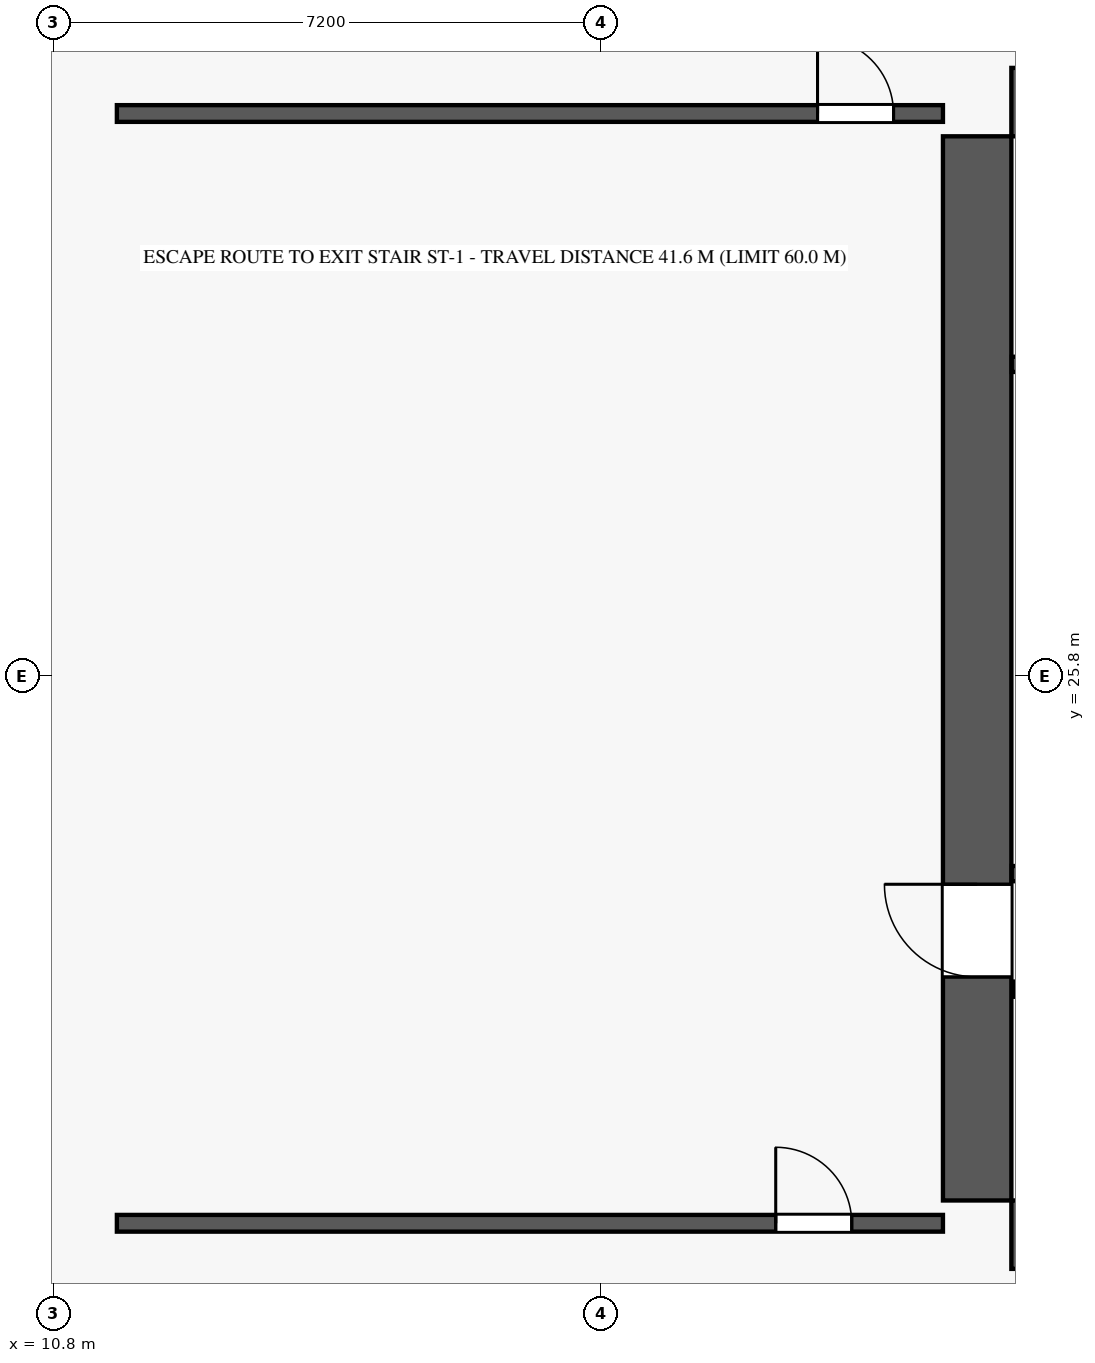
"""IFC4 building model, lengths in metres.
Left out: names, types, materials, properties, quantities, classifications, styles, units other than length and angle.
Written with IfcOpenShell. Run it as: python <this file> out.ifc"""

import sys

from ifc_helpers import new_model, si_unit, direction, frame, frame_2d, origin, origin_2d, place, context, subcontext, project, spatial, rectangle, extrude, element, fill, save


model = new_model("IFC4")
c1 = context("Model", 3, precision=1e-05, world=origin(), true_north=direction((0.0, 1.0)))
c2 = subcontext(c1, "Body", "Model", "MODEL_VIEW")
j1 = project(units=[si_unit("LENGTHUNIT", "METRE"), si_unit("PLANEANGLEUNIT", "RADIAN")], contexts=[c1])
p1 = place(None, origin())
s1 = spatial("IfcSite", under=j1, at=p1, CompositionType="ELEMENT")
p2 = place(p1, origin())
s2 = spatial("IfcBuilding", under=s1, at=p2, CompositionType="ELEMENT")
p3 = place(p2, frame((0.0, 0.0, 74.6)))
s3 = spatial("IfcBuildingStorey", under=s2, at=p3, CompositionType="ELEMENT", Elevation=74.6)
for number, where, z_axis, x_axis in (
    (1, (22.95, 18.45, 0.0), (0.0, 0.0, 1.0), (1.0, 0.0, 0.0)),
    (2, (22.95, 33.35, 0.0), (0.0, 0.0, 1.0), (1.0, 0.0, 0.0)),
):
    element("IfcColumn", number, at=place(p3, frame(where, z_axis=z_axis, x_axis=x_axis)), inside=s3, PredefinedType="COLUMN", context=c2, shape_type="SweptSolid", body=[
        extrude(rectangle(XDim=0.9, YDim=0.9, at=origin_2d()), origin(), (0.0, 0.0, 1.0), 5.4),
    ])
for number, where, z_axis, x_axis in (
    (3, (23.4, 18.45, 0.0), (0.0, 0.0, 1.0), (1.0, 0.0, 0.0)),
    (4, (23.4, 33.35, 0.0), (0.0, 0.0, 1.0), (1.0, 0.0, 0.0)),
):
    element("IfcWall", number, at=place(p3, frame(where, z_axis=z_axis, x_axis=x_axis)), inside=s3, PredefinedType="SHEAR", context=c2, shape_type="SweptSolid", body=[
        extrude(rectangle(XDim=18.0, YDim=0.9, at=frame_2d((9.0, 0.0))), origin(), (0.0, 0.0, 1.0), 5.18),
    ])
p4 = place(p3, frame((22.95, 18.9, 0.0), z_axis=(0.0, 0.0, 1.0), x_axis=(0.0, 1.0, 0.0)))
e5 = element("IfcWall", 5, at=p4, inside=s3, PredefinedType="SHEAR", context=c2, shape_type="SweptSolid", body=[
    extrude(rectangle(XDim=14.0, YDim=0.9, at=frame_2d((7.0, 0.0))), origin(), (0.0, 0.0, 1.0), 5.18),
])
p5 = place(p4, frame((2.94, 0.0, 0.0)))
e6 = element("IfcOpeningElement", 6, at=p5, cuts=e5, PredefinedType="OPENING", context=c2, shape_type="SweptSolid", body=[
    extrude(rectangle(XDim=1.22, YDim=2.25, at=frame_2d((0.61, 1.125))), frame((0.0, 0.46, 0.0), z_axis=(0.0, -1.0, 0.0), x_axis=(1.0, 0.0, 0.0)), (0.0, 0.0, 1.0), 0.92),
])
p6 = place(p3, frame((23.405, 23.2, 0.0), z_axis=(0.0, 0.0, 1.0), x_axis=(1.0, 0.0, 0.0)))
e7 = element("IfcWall", 7, at=p6, inside=s3, PredefinedType="PLUMBINGWALL", context=c2, shape_type="SweptSolid", body=[
    extrude(rectangle(XDim=3.27, YDim=0.2, at=frame_2d((1.635, 0.0))), origin(), (0.0, 0.0, 1.0), 5.18),
])
p7 = place(p3, frame((23.405, 29.9, 0.0), z_axis=(0.0, 0.0, 1.0), x_axis=(1.0, 0.0, 0.0)))
e8 = element("IfcWall", 8, at=p7, inside=s3, PredefinedType="PLUMBINGWALL", context=c2, shape_type="SweptSolid", body=[
    extrude(rectangle(XDim=3.27, YDim=0.2, at=frame_2d((1.635, 0.0))), origin(), (0.0, 0.0, 1.0), 5.18),
])
p8 = place(p7, frame((1.85, 0.0, 0.0)))
e9 = element("IfcOpeningElement", 9, at=p8, cuts=e8, PredefinedType="OPENING", context=c2, shape_type="SweptSolid", body=[
    extrude(rectangle(XDim=0.85, YDim=2.05, at=frame_2d((0.425, 1.025))), frame((0.0, 0.11, 0.0), z_axis=(0.0, -1.0, 0.0), x_axis=(1.0, 0.0, 0.0)), (0.0, 0.0, 1.0), 0.22),
])
p9 = place(p3, frame((23.42, 21.68, 0.0), z_axis=(0.0, 0.0, 1.0), x_axis=(1.0, 0.0, 0.0)))
e10 = element("IfcWall", 10, at=p9, inside=s3, PredefinedType="PLUMBINGWALL", context=c2, shape_type="SweptSolid", body=[
    extrude(rectangle(XDim=17.96, YDim=0.2, at=frame_2d((8.98, 0.0))), origin(), (0.0, 0.0, 1.0), 5.18),
])
p10 = place(p9, frame((4.45, 0.0, 0.0)))
e11 = element("IfcOpeningElement", 11, at=p10, cuts=e10, PredefinedType="OPENING", context=c2, shape_type="SweptSolid", body=[
    extrude(rectangle(XDim=1.1, YDim=2.2, at=frame_2d((0.55, 1.1))), frame((0.0, 0.11, 0.0), z_axis=(0.0, -1.0, 0.0), x_axis=(1.0, 0.0, 0.0)), (0.0, 0.0, 1.0), 0.22),
])
p11 = place(p9, frame((6.85, 0.0, 0.0)))
e12 = element("IfcOpeningElement", 12, at=p11, cuts=e10, PredefinedType="OPENING", context=c2, shape_type="SweptSolid", body=[
    extrude(rectangle(XDim=1.1, YDim=2.2, at=frame_2d((0.55, 1.1))), frame((0.0, 0.11, 0.0), z_axis=(0.0, -1.0, 0.0), x_axis=(1.0, 0.0, 0.0)), (0.0, 0.0, 1.0), 0.22),
])
p12 = place(p9, frame((9.25, 0.0, 0.0)))
e13 = element("IfcOpeningElement", 13, at=p12, cuts=e10, PredefinedType="OPENING", context=c2, shape_type="SweptSolid", body=[
    extrude(rectangle(XDim=1.1, YDim=2.2, at=frame_2d((0.55, 1.1))), frame((0.0, 0.11, 0.0), z_axis=(0.0, -1.0, 0.0), x_axis=(1.0, 0.0, 0.0)), (0.0, 0.0, 1.0), 0.22),
])
p13 = place(p9, frame((0.25, 0.0, 0.0)))
e14 = element("IfcOpeningElement", 14, at=p13, cuts=e10, PredefinedType="OPENING", context=c2, shape_type="SweptSolid", body=[
    extrude(rectangle(XDim=0.85, YDim=2.05, at=frame_2d((0.425, 1.025))), frame((0.0, 0.11, 0.0), z_axis=(0.0, -1.0, 0.0), x_axis=(1.0, 0.0, 0.0)), (0.0, 0.0, 1.0), 0.22),
])
p14 = place(p9, frame((2.05, 0.0, 0.0)))
e15 = element("IfcOpeningElement", 15, at=p14, cuts=e10, PredefinedType="OPENING", context=c2, shape_type="SweptSolid", body=[
    extrude(rectangle(XDim=0.85, YDim=2.05, at=frame_2d((0.425, 1.025))), frame((0.0, 0.11, 0.0), z_axis=(0.0, -1.0, 0.0), x_axis=(1.0, 0.0, 0.0)), (0.0, 0.0, 1.0), 0.22),
])
p15 = place(p9, frame((14.6, 0.0, 0.0)))
e16 = element("IfcOpeningElement", 16, at=p15, cuts=e10, PredefinedType="OPENING", context=c2, shape_type="SweptSolid", body=[
    extrude(rectangle(XDim=0.85, YDim=2.05, at=frame_2d((0.425, 1.025))), frame((0.0, 0.11, 0.0), z_axis=(0.0, -1.0, 0.0), x_axis=(1.0, 0.0, 0.0)), (0.0, 0.0, 1.0), 0.22),
])
p16 = place(p3, frame((11.632, 18.6, 0.0), z_axis=(0.0, 0.0, 1.0), x_axis=(1.0, 0.0, 0.0)))
e17 = element("IfcWall", 17, at=p16, inside=s3, PredefinedType="PARTITIONING", context=c2, shape_type="SweptSolid", body=[
    extrude(rectangle(XDim=10.868, YDim=0.22, at=frame_2d((5.434, 0.0))), origin(), (0.0, 0.0, 1.0), 4.487),
])
p17 = place(p16, frame((8.668, 0.0, 0.0)))
e18 = element("IfcOpeningElement", 18, at=p17, cuts=e17, PredefinedType="OPENING", context=c2, shape_type="SweptSolid", body=[
    extrude(rectangle(XDim=1.0, YDim=2.15, at=frame_2d((0.5, 1.075))), frame((0.0, 0.12, 0.0), z_axis=(0.0, -1.0, 0.0), x_axis=(1.0, 0.0, 0.0)), (0.0, 0.0, 1.0), 0.24),
])
p18 = place(p3, frame((11.632, 33.2, 0.0), z_axis=(0.0, 0.0, 1.0), x_axis=(1.0, 0.0, 0.0)))
e19 = element("IfcWall", 19, at=p18, inside=s3, PredefinedType="PARTITIONING", context=c2, shape_type="SweptSolid", body=[
    extrude(rectangle(XDim=10.868, YDim=0.22, at=frame_2d((5.434, 0.0))), origin(), (0.0, 0.0, 1.0), 4.487),
])
p19 = place(p18, frame((9.218, 0.0, 0.0)))
e20 = element("IfcOpeningElement", 20, at=p19, cuts=e19, PredefinedType="OPENING", context=c2, shape_type="SweptSolid", body=[
    extrude(rectangle(XDim=1.0, YDim=2.15, at=frame_2d((0.5, 1.075))), frame((0.0, 0.12, 0.0), z_axis=(0.0, -1.0, 0.0), x_axis=(1.0, 0.0, 0.0)), (0.0, 0.0, 1.0), 0.24),
])
p20 = place(p5, origin())
e21 = element("IfcDoor", 21, at=p20, inside=s3, OperationType="SINGLE_SWING_RIGHT", PredefinedType="DOOR", context=c2, shape_type="SweptSolid", body=[
    extrude(rectangle(XDim=1.22, YDim=2.25, at=frame_2d((0.61, 1.125))), frame((0.0, 0.025, 0.0), z_axis=(0.0, -1.0, 0.0), x_axis=(1.0, 0.0, 0.0)), (0.0, 0.0, 1.0), 0.05),
])
fill(e6, e21)
p21 = place(p17, origin())
e22 = element("IfcDoor", 22, at=p21, inside=s3, OperationType="SINGLE_SWING_LEFT", PredefinedType="DOOR", context=c2, shape_type="SweptSolid", body=[
    extrude(rectangle(XDim=1.0, YDim=2.15, at=frame_2d((0.5, 1.075))), frame((0.0, 0.025, 0.0), z_axis=(0.0, -1.0, 0.0), x_axis=(1.0, 0.0, 0.0)), (0.0, 0.0, 1.0), 0.05),
])
fill(e18, e22)
p22 = place(p19, origin())
e23 = element("IfcDoor", 23, at=p22, inside=s3, OperationType="SINGLE_SWING_LEFT", PredefinedType="DOOR", context=c2, shape_type="SweptSolid", body=[
    extrude(rectangle(XDim=1.0, YDim=2.15, at=frame_2d((0.5, 1.075))), frame((0.0, 0.025, 0.0), z_axis=(0.0, -1.0, 0.0), x_axis=(1.0, 0.0, 0.0)), (0.0, 0.0, 1.0), 0.05),
])
fill(e20, e23)
save(model, sys.argv[1])
